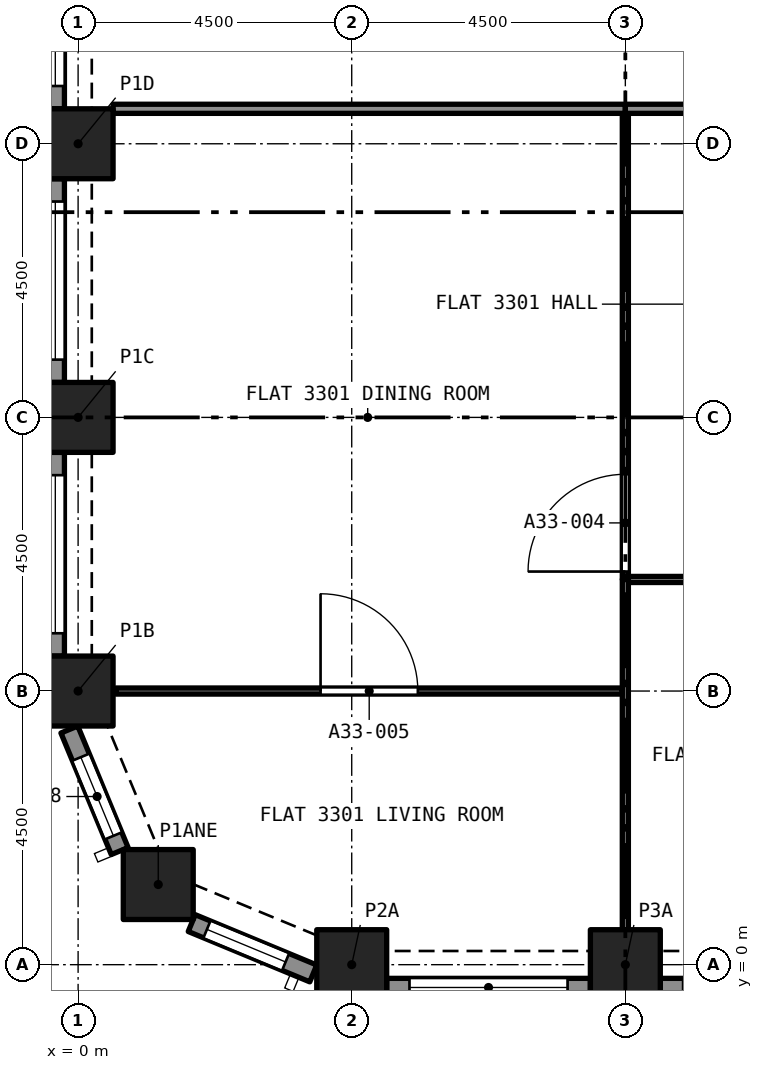
"""IFC4 building model, lengths in metres.
Left out: names, types, materials, properties, quantities, classifications, styles, units other than length and angle.
Written with IfcOpenShell. Run it as: python <this file> out.ifc"""

import sys

from ifc_helpers import new_model, si_unit, direction, frame, frame_2d, origin, origin_2d, place, context, subcontext, project, spatial, rectangle, extrude, element, fill, save


model = new_model("IFC4")
c1 = context("Model", 3, precision=1e-05, world=origin(), true_north=direction((0.0, 1.0)))
c2 = subcontext(c1, "Body", "Model", "MODEL_VIEW")
j1 = project(units=[si_unit("LENGTHUNIT", "METRE"), si_unit("PLANEANGLEUNIT", "RADIAN")], contexts=[c1])
p1 = place(None, origin())
s1 = spatial("IfcSite", under=j1, at=p1, CompositionType="ELEMENT")
p2 = place(p1, origin())
s2 = spatial("IfcBuilding", under=s1, at=p2, CompositionType="ELEMENT")
p3 = place(p2, frame((0.0, 0.0, 118.4)))
s3 = spatial("IfcBuildingStorey", under=s2, at=p3, CompositionType="ELEMENT", Elevation=118.4)
for number, where, z_axis, x_axis in (
    (1, (4.5, 0.0, 0.0), (0.0, 0.0, 1.0), (1.0, 0.0, 0.0)),
    (2, (9.0, 0.0, 0.0), (0.0, 0.0, 1.0), (1.0, 0.0, 0.0)),
    (3, (1.318, 1.318, 0.0), (0.0, 0.0, 1.0), (1.0, 0.0, 0.0)),
    (4, (0.0, 4.5, 0.0), (0.0, 0.0, 1.0), (1.0, 0.0, 0.0)),
    (5, (0.0, 9.0, 0.0), (0.0, 0.0, 1.0), (1.0, 0.0, 0.0)),
    (6, (0.0, 13.5, 0.0), (0.0, 0.0, 1.0), (1.0, 0.0, 0.0)),
):
    element("IfcColumn", number, at=place(p3, frame(where, z_axis=z_axis, x_axis=x_axis)), inside=s3, PredefinedType="COLUMN", context=c2, shape_type="SweptSolid", body=[
        extrude(rectangle(XDim=1.15, YDim=1.15, at=origin_2d()), origin(), (0.0, 0.0, 1.0), 3.2),
    ])
p4 = place(p3, frame((0.684, 1.869, 0.0), z_axis=(0.0, 0.0, 1.0), x_axis=(-0.382723818695, 0.923862802911, 0.0)))
e7 = element("IfcWall", 7, at=p4, inside=s3, PredefinedType="SOLIDWALL", context=c2, shape_type="SweptSolid", body=[
    extrude(rectangle(XDim=2.164, YDim=0.3, at=frame_2d((1.082, 0.0))), origin(), (0.0, 0.0, 1.0), 3.2),
])
p5 = place(p4, frame((0.271, 0.0, 0.45)))
e8 = element("IfcOpeningElement", 8, at=p5, cuts=e7, PredefinedType="OPENING", context=c2, shape_type="SweptSolid", body=[
    extrude(rectangle(XDim=1.4, YDim=1.95, at=frame_2d((0.7, 0.975))), frame((0.0, 0.16, 0.0), z_axis=(0.0, -1.0, 0.0), x_axis=(1.0, 0.0, 0.0)), (0.0, 0.0, 1.0), 0.32),
])
p6 = place(p3, frame((3.868, -0.144, 0.0), z_axis=(0.0, 0.0, 1.0), x_axis=(-0.923862802911, 0.382723818695, 0.0)))
e9 = element("IfcWall", 9, at=p6, inside=s3, PredefinedType="SOLIDWALL", context=c2, shape_type="SweptSolid", body=[
    extrude(rectangle(XDim=2.164, YDim=0.3, at=frame_2d((1.082, 0.0))), origin(), (0.0, 0.0, 1.0), 3.2),
])
p7 = place(p6, frame((0.493, 0.0, 0.45)))
e10 = element("IfcOpeningElement", 10, at=p7, cuts=e9, PredefinedType="OPENING", context=c2, shape_type="SweptSolid", body=[
    extrude(rectangle(XDim=1.4, YDim=1.95, at=frame_2d((0.7, 0.975))), frame((0.0, 0.16, 0.0), z_axis=(0.0, -1.0, 0.0), x_axis=(1.0, 0.0, 0.0)), (0.0, 0.0, 1.0), 0.32),
])
p8 = place(p3, frame((8.425, -0.375, 0.0), z_axis=(0.0, 0.0, 1.0), x_axis=(-1.0, 0.0, 0.0)))
e11 = element("IfcWall", 11, at=p8, inside=s3, PredefinedType="SOLIDWALL", context=c2, shape_type="SweptSolid", body=[
    extrude(rectangle(XDim=3.35, YDim=0.3, at=frame_2d((1.675, 0.0))), origin(), (0.0, 0.0, 1.0), 3.2),
])
p9 = place(p8, frame((0.375, 0.0, 0.45)))
e12 = element("IfcOpeningElement", 12, at=p9, cuts=e11, PredefinedType="OPENING", context=c2, shape_type="SweptSolid", body=[
    extrude(rectangle(XDim=2.6, YDim=1.95, at=frame_2d((1.3, 0.975))), frame((0.0, 0.16, 0.0), z_axis=(0.0, -1.0, 0.0), x_axis=(1.0, 0.0, 0.0)), (0.0, 0.0, 1.0), 0.32),
])
p10 = place(p3, frame((12.925, -0.375, 0.0), z_axis=(0.0, 0.0, 1.0), x_axis=(-1.0, 0.0, 0.0)))
e13 = element("IfcWall", 13, at=p10, inside=s3, PredefinedType="SOLIDWALL", context=c2, shape_type="SweptSolid", body=[
    extrude(rectangle(XDim=3.35, YDim=0.3, at=frame_2d((1.675, 0.0))), origin(), (0.0, 0.0, 1.0), 3.2),
])
p11 = place(p10, frame((0.375, 0.0, 0.45)))
e14 = element("IfcOpeningElement", 14, at=p11, cuts=e13, PredefinedType="OPENING", context=c2, shape_type="SweptSolid", body=[
    extrude(rectangle(XDim=2.6, YDim=1.95, at=frame_2d((1.3, 0.975))), frame((0.0, 0.16, 0.0), z_axis=(0.0, -1.0, 0.0), x_axis=(1.0, 0.0, 0.0)), (0.0, 0.0, 1.0), 0.32),
])
p12 = place(p3, frame((-0.375, 14.075, 0.0), z_axis=(0.0, 0.0, 1.0), x_axis=(0.0, 1.0, 0.0)))
e15 = element("IfcWall", 15, at=p12, inside=s3, PredefinedType="SOLIDWALL", context=c2, shape_type="SweptSolid", body=[
    extrude(rectangle(XDim=3.35, YDim=0.3, at=frame_2d((1.675, 0.0))), origin(), (0.0, 0.0, 1.0), 3.2),
])
p13 = place(p12, frame((0.375, 0.0, 0.45)))
e16 = element("IfcOpeningElement", 16, at=p13, cuts=e15, PredefinedType="OPENING", context=c2, shape_type="SweptSolid", body=[
    extrude(rectangle(XDim=2.6, YDim=1.95, at=frame_2d((1.3, 0.975))), frame((0.0, 0.16, 0.0), z_axis=(0.0, -1.0, 0.0), x_axis=(1.0, 0.0, 0.0)), (0.0, 0.0, 1.0), 0.32),
])
p14 = place(p3, frame((-0.375, 9.575, 0.0), z_axis=(0.0, 0.0, 1.0), x_axis=(0.0, 1.0, 0.0)))
e17 = element("IfcWall", 17, at=p14, inside=s3, PredefinedType="SOLIDWALL", context=c2, shape_type="SweptSolid", body=[
    extrude(rectangle(XDim=3.35, YDim=0.3, at=frame_2d((1.675, 0.0))), origin(), (0.0, 0.0, 1.0), 3.2),
])
p15 = place(p14, frame((0.375, 0.0, 0.45)))
e18 = element("IfcOpeningElement", 18, at=p15, cuts=e17, PredefinedType="OPENING", context=c2, shape_type="SweptSolid", body=[
    extrude(rectangle(XDim=2.6, YDim=1.95, at=frame_2d((1.3, 0.975))), frame((0.0, 0.16, 0.0), z_axis=(0.0, -1.0, 0.0), x_axis=(1.0, 0.0, 0.0)), (0.0, 0.0, 1.0), 0.32),
])
p16 = place(p3, frame((-0.375, 5.075, 0.0), z_axis=(0.0, 0.0, 1.0), x_axis=(0.0, 1.0, 0.0)))
e19 = element("IfcWall", 19, at=p16, inside=s3, PredefinedType="SOLIDWALL", context=c2, shape_type="SweptSolid", body=[
    extrude(rectangle(XDim=3.35, YDim=0.3, at=frame_2d((1.675, 0.0))), origin(), (0.0, 0.0, 1.0), 3.2),
])
p17 = place(p16, frame((0.375, 0.0, 0.45)))
e20 = element("IfcOpeningElement", 20, at=p17, cuts=e19, PredefinedType="OPENING", context=c2, shape_type="SweptSolid", body=[
    extrude(rectangle(XDim=2.6, YDim=1.95, at=frame_2d((1.3, 0.975))), frame((0.0, 0.16, 0.0), z_axis=(0.0, -1.0, 0.0), x_axis=(1.0, 0.0, 0.0)), (0.0, 0.0, 1.0), 0.32),
])
p18 = place(p3, frame((13.5, 6.335, 0.0), z_axis=(0.0, 0.0, 1.0), x_axis=(-1.0, 0.0, 0.0)))
e21 = element("IfcWall", 21, at=p18, inside=s3, PredefinedType="PARTITIONING", context=c2, shape_type="SweptSolid", body=[
    extrude(rectangle(XDim=4.45, YDim=0.1, at=frame_2d((2.225, 0.0))), origin(), (0.0, 0.0, 1.0), 2.9),
])
p19 = place(p18, frame((1.8, 0.0, 0.0)))
e22 = element("IfcOpeningElement", 22, at=p19, cuts=e21, PredefinedType="OPENING", context=c2, shape_type="SweptSolid", body=[
    extrude(rectangle(XDim=0.9, YDim=2.1, at=frame_2d((0.45, 1.05))), frame((0.0, 0.06, 0.0), z_axis=(0.0, -1.0, 0.0), x_axis=(1.0, 0.0, 0.0)), (0.0, 0.0, 1.0), 0.12),
])
p20 = place(p3, frame((9.0, 0.575, 0.0), z_axis=(0.0, 0.0, 1.0), x_axis=(0.0, 1.0, 0.0)))
e23 = element("IfcWall", 23, at=p20, inside=s3, PredefinedType="PARTITIONING", context=c2, shape_type="SweptSolid", body=[
    extrude(rectangle(XDim=5.76, YDim=0.1, at=frame_2d((2.88, 0.0))), origin(), (0.0, 0.0, 1.0), 2.9),
])
p21 = place(p3, frame((9.0, 6.335, 0.0), z_axis=(0.0, 0.0, 1.0), x_axis=(0.0, 1.0, 0.0)))
e24 = element("IfcWall", 24, at=p21, inside=s3, PredefinedType="PARTITIONING", context=c2, shape_type="SweptSolid", body=[
    extrude(rectangle(XDim=7.665, YDim=0.1, at=frame_2d((3.833, 0.0))), origin(), (0.0, 0.0, 1.0), 2.9),
])
p22 = place(p21, frame((0.13, 0.0, 0.0)))
e25 = element("IfcOpeningElement", 25, at=p22, cuts=e24, PredefinedType="OPENING", context=c2, shape_type="SweptSolid", body=[
    extrude(rectangle(XDim=1.6, YDim=2.1, at=frame_2d((0.8, 1.05))), frame((0.0, 0.06, 0.0), z_axis=(0.0, -1.0, 0.0), x_axis=(1.0, 0.0, 0.0)), (0.0, 0.0, 1.0), 0.12),
])
p23 = place(p3, frame((0.622, 4.5, 0.0), z_axis=(0.0, 0.0, 1.0), x_axis=(1.0, 0.0, 0.0)))
e26 = element("IfcWall", 26, at=p23, inside=s3, PredefinedType="PARTITIONING", context=c2, shape_type="SweptSolid", body=[
    extrude(rectangle(XDim=8.328, YDim=0.1, at=frame_2d((4.164, 0.0))), origin(), (0.0, 0.0, 1.0), 2.9),
])
p24 = place(p23, frame((3.365, 0.0, 0.0)))
e27 = element("IfcOpeningElement", 27, at=p24, cuts=e26, PredefinedType="OPENING", context=c2, shape_type="SweptSolid", body=[
    extrude(rectangle(XDim=1.6, YDim=2.1, at=frame_2d((0.8, 1.05))), frame((0.0, 0.06, 0.0), z_axis=(0.0, -1.0, 0.0), x_axis=(1.0, 0.0, 0.0)), (0.0, 0.0, 1.0), 0.12),
])
p25 = place(p3, frame((0.575, 14.075, 0.0), z_axis=(0.0, 0.0, 1.0), x_axis=(1.0, 0.0, 0.0)))
e28 = element("IfcWall", 28, at=p25, inside=s3, PredefinedType="PARTITIONING", context=c2, shape_type="SweptSolid", body=[
    extrude(rectangle(XDim=8.425, YDim=0.15, at=frame_2d((4.212, 0.0))), origin(), (0.0, 0.0, 1.0), 2.9),
])
p26 = place(p3, frame((11.925, 14.075, 0.0), z_axis=(0.0, 0.0, 1.0), x_axis=(-1.0, 0.0, 0.0)))
e29 = element("IfcWall", 29, at=p26, inside=s3, PredefinedType="PARTITIONING", context=c2, shape_type="SweptSolid", body=[
    extrude(rectangle(XDim=2.925, YDim=0.15, at=frame_2d((1.462, 0.0))), origin(), (0.0, 0.0, 1.0), 2.9),
])
p27 = place(p26, frame((0.175, 0.0, 0.0)))
e30 = element("IfcOpeningElement", 30, at=p27, cuts=e29, PredefinedType="OPENING", context=c2, shape_type="SweptSolid", body=[
    extrude(rectangle(XDim=1.0, YDim=2.1, at=frame_2d((0.5, 1.05))), frame((0.0, 0.085, 0.0), z_axis=(0.0, -1.0, 0.0), x_axis=(1.0, 0.0, 0.0)), (0.0, 0.0, 1.0), 0.17),
])
p28 = place(p5, origin())
e31 = element("IfcWindow", 31, at=p28, inside=s3, PartitioningType="SINGLE_PANEL", PredefinedType="WINDOW", context=c2, shape_type="SweptSolid", body=[
    extrude(rectangle(XDim=1.4, YDim=1.95, at=frame_2d((0.7, 0.975))), frame((0.0, 0.03, 0.0), z_axis=(0.0, -1.0, 0.0), x_axis=(1.0, 0.0, 0.0)), (0.0, 0.0, 1.0), 0.06),
])
fill(e8, e31)
p29 = place(p7, origin())
e32 = element("IfcWindow", 32, at=p29, inside=s3, PartitioningType="SINGLE_PANEL", PredefinedType="WINDOW", context=c2, shape_type="SweptSolid", body=[
    extrude(rectangle(XDim=1.4, YDim=1.95, at=frame_2d((0.7, 0.975))), frame((0.0, 0.03, 0.0), z_axis=(0.0, -1.0, 0.0), x_axis=(1.0, 0.0, 0.0)), (0.0, 0.0, 1.0), 0.06),
])
fill(e10, e32)
p30 = place(p9, origin())
e33 = element("IfcWindow", 33, at=p30, inside=s3, PartitioningType="SINGLE_PANEL", PredefinedType="WINDOW", context=c2, shape_type="SweptSolid", body=[
    extrude(rectangle(XDim=2.6, YDim=1.95, at=frame_2d((1.3, 0.975))), frame((0.0, 0.03, 0.0), z_axis=(0.0, -1.0, 0.0), x_axis=(1.0, 0.0, 0.0)), (0.0, 0.0, 1.0), 0.06),
])
fill(e12, e33)
p31 = place(p13, origin())
e34 = element("IfcWindow", 34, at=p31, inside=s3, PartitioningType="SINGLE_PANEL", PredefinedType="WINDOW", context=c2, shape_type="SweptSolid", body=[
    extrude(rectangle(XDim=2.6, YDim=1.95, at=frame_2d((1.3, 0.975))), frame((0.0, 0.03, 0.0), z_axis=(0.0, -1.0, 0.0), x_axis=(1.0, 0.0, 0.0)), (0.0, 0.0, 1.0), 0.06),
])
fill(e16, e34)
p32 = place(p15, origin())
e35 = element("IfcWindow", 35, at=p32, inside=s3, PartitioningType="SINGLE_PANEL", PredefinedType="WINDOW", context=c2, shape_type="SweptSolid", body=[
    extrude(rectangle(XDim=2.6, YDim=1.95, at=frame_2d((1.3, 0.975))), frame((0.0, 0.03, 0.0), z_axis=(0.0, -1.0, 0.0), x_axis=(1.0, 0.0, 0.0)), (0.0, 0.0, 1.0), 0.06),
])
fill(e18, e35)
p33 = place(p17, origin())
e36 = element("IfcWindow", 36, at=p33, inside=s3, PartitioningType="SINGLE_PANEL", PredefinedType="WINDOW", context=c2, shape_type="SweptSolid", body=[
    extrude(rectangle(XDim=2.6, YDim=1.95, at=frame_2d((1.3, 0.975))), frame((0.0, 0.03, 0.0), z_axis=(0.0, -1.0, 0.0), x_axis=(1.0, 0.0, 0.0)), (0.0, 0.0, 1.0), 0.06),
])
fill(e20, e36)
p34 = place(p22, origin())
e37 = element("IfcDoor", 37, at=p34, inside=s3, OperationType="SINGLE_SWING_LEFT", PredefinedType="DOOR", context=c2, shape_type="SweptSolid", body=[
    extrude(rectangle(XDim=1.6, YDim=2.1, at=frame_2d((0.8, 1.05))), frame((0.0, 0.025, 0.0), z_axis=(0.0, -1.0, 0.0), x_axis=(1.0, 0.0, 0.0)), (0.0, 0.0, 1.0), 0.05),
])
fill(e25, e37)
p35 = place(p24, origin())
e38 = element("IfcDoor", 38, at=p35, inside=s3, OperationType="SINGLE_SWING_RIGHT", PredefinedType="DOOR", context=c2, shape_type="SweptSolid", body=[
    extrude(rectangle(XDim=1.6, YDim=2.1, at=frame_2d((0.8, 1.05))), frame((0.0, 0.025, 0.0), z_axis=(0.0, -1.0, 0.0), x_axis=(1.0, 0.0, 0.0)), (0.0, 0.0, 1.0), 0.05),
])
fill(e27, e38)
save(model, sys.argv[1])
